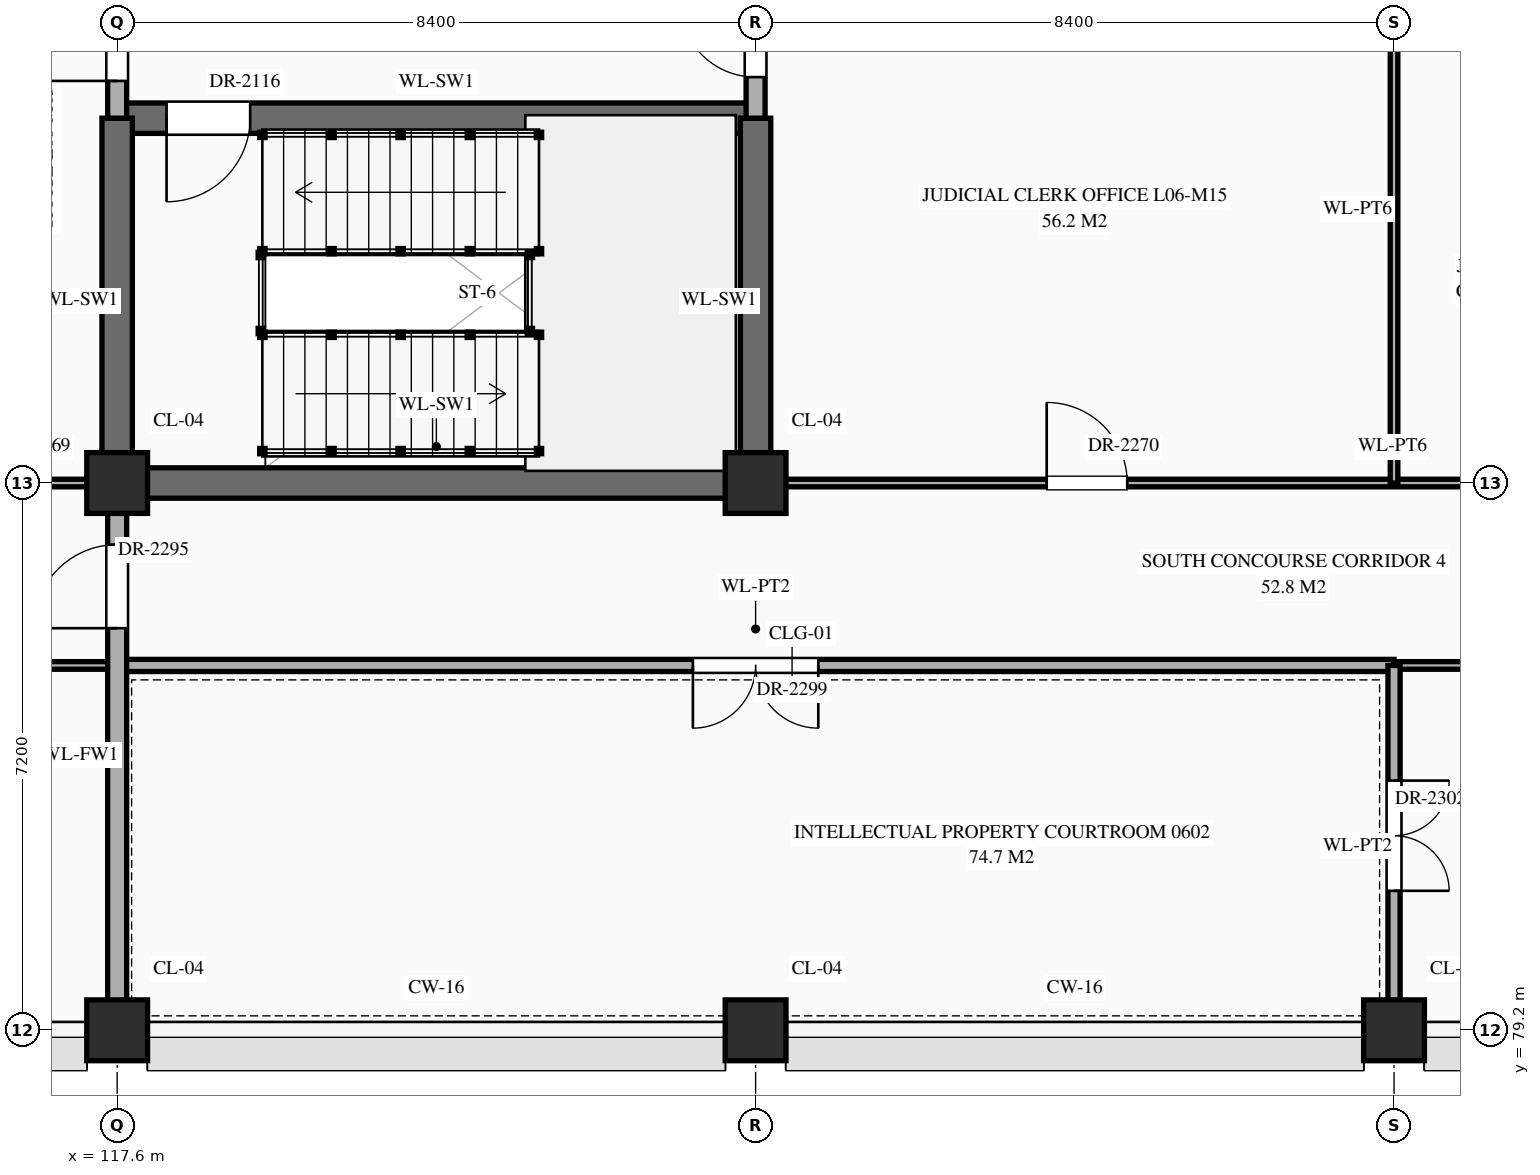
"""IFC4 building model, lengths in metres.
Left out: names, types, materials, properties, quantities, classifications, styles, units other than length and angle.
Written with IfcOpenShell. Run it as: python <this file> out.ifc"""

import sys

from ifc_helpers import new_model, si_unit, direction, frame, frame_2d, origin, origin_2d, place, context, subcontext, project, spatial, rectangle, extrude, element, fill, save


model = new_model("IFC4")
c1 = context("Model", 3, precision=1e-05, world=origin(), true_north=direction((0.0, 1.0)))
c2 = subcontext(c1, "Body", "Model", "MODEL_VIEW")
j1 = project(units=[si_unit("LENGTHUNIT", "METRE"), si_unit("PLANEANGLEUNIT", "RADIAN")], contexts=[c1])
p1 = place(None, origin())
s1 = spatial("IfcSite", under=j1, at=p1, CompositionType="ELEMENT")
p2 = place(p1, origin())
s2 = spatial("IfcBuilding", under=s1, at=p2, CompositionType="ELEMENT")
p3 = place(p2, frame((0.0, 0.0, 26.1)))
s3 = spatial("IfcBuildingStorey", under=s2, at=p3, CompositionType="ELEMENT", Elevation=26.1)
for number, where, z_axis, x_axis in (
    (1, (117.6, 79.2, 0.0), (0.0, 0.0, 1.0), (1.0, 0.0, 0.0)),
    (2, (117.6, 86.4, 0.0), (0.0, 0.0, 1.0), (1.0, 0.0, 0.0)),
    (3, (126.0, 79.2, 0.0), (0.0, 0.0, 1.0), (1.0, 0.0, 0.0)),
    (4, (126.0, 86.4, 0.0), (0.0, 0.0, 1.0), (1.0, 0.0, 0.0)),
    (5, (134.4, 79.2, 0.0), (0.0, 0.0, 1.0), (1.0, 0.0, 0.0)),
):
    element("IfcColumn", number, at=place(p3, frame(where, z_axis=z_axis, x_axis=x_axis)), inside=s3, PredefinedType="COLUMN", context=c2, shape_type="SweptSolid", body=[
        extrude(rectangle(XDim=0.8, YDim=0.8, at=origin_2d()), origin(), (0.0, 0.0, 1.0), 4.5),
    ])
p4 = place(p3, frame((100.8, 84.0, 0.0), z_axis=(0.0, 0.0, 1.0), x_axis=(1.0, 0.0, 0.0)))
e6 = element("IfcWall", 6, at=p4, inside=s3, PredefinedType="STANDARD", context=c2, shape_type="SweptSolid", body=[
    extrude(rectangle(XDim=16.8, YDim=0.1, at=frame_2d((8.4, 0.0))), origin(), (0.0, 0.0, 1.0), 4.24),
])
p5 = place(p4, frame((3.62, 0.0, 0.0)))
e7 = element("IfcOpeningElement", 7, at=p5, cuts=e6, PredefinedType="OPENING", context=c2, shape_type="SweptSolid", body=[
    extrude(rectangle(XDim=1.16, YDim=2.3, at=frame_2d((0.58, 1.15))), frame((0.0, 0.062, 0.0), z_axis=(0.0, -1.0, 0.0), x_axis=(1.0, 0.0, 0.0)), (0.0, 0.0, 1.0), 0.124),
])
p6 = place(p4, frame((12.0, 0.0, 0.0)))
e8 = element("IfcOpeningElement", 8, at=p6, cuts=e6, PredefinedType="OPENING", context=c2, shape_type="SweptSolid", body=[
    extrude(rectangle(XDim=1.2, YDim=2.35, at=frame_2d((0.6, 1.175))), frame((0.0, 0.062, 0.0), z_axis=(0.0, -1.0, 0.0), x_axis=(1.0, 0.0, 0.0)), (0.0, 0.0, 1.0), 0.124),
])
p7 = place(p3, frame((117.6, 84.0, 0.0), z_axis=(0.0, 0.0, 1.0), x_axis=(1.0, 0.0, 0.0)))
e9 = element("IfcWall", 9, at=p7, inside=s3, PredefinedType="STANDARD", context=c2, shape_type="SweptSolid", body=[
    extrude(rectangle(XDim=16.8, YDim=0.16, at=frame_2d((8.4, 0.0))), origin(), (0.0, 0.0, 1.0), 4.24),
])
p8 = place(p7, frame((7.575, 0.0, 0.0)))
e10 = element("IfcOpeningElement", 10, at=p8, cuts=e9, PredefinedType="OPENING", context=c2, shape_type="SweptSolid", body=[
    extrude(rectangle(XDim=1.65, YDim=2.4, at=frame_2d((0.825, 1.2))), frame((0.0, 0.092, 0.0), z_axis=(0.0, -1.0, 0.0), x_axis=(1.0, 0.0, 0.0)), (0.0, 0.0, 1.0), 0.184),
])
p9 = place(p3, frame((134.4, 84.0, 0.0), z_axis=(0.0, 0.0, 1.0), x_axis=(1.0, 0.0, 0.0)))
e11 = element("IfcWall", 11, at=p9, inside=s3, PredefinedType="STANDARD", context=c2, shape_type="SweptSolid", body=[
    extrude(rectangle(XDim=8.36, YDim=0.1, at=frame_2d((4.18, 0.0))), origin(), (0.0, 0.0, 1.0), 4.24),
])
p10 = place(p9, frame((3.405, 0.0, 0.0)))
e12 = element("IfcOpeningElement", 12, at=p10, cuts=e11, PredefinedType="OPENING", context=c2, shape_type="SweptSolid", body=[
    extrude(rectangle(XDim=1.55, YDim=2.35, at=frame_2d((0.775, 1.175))), frame((0.0, 0.062, 0.0), z_axis=(0.0, -1.0, 0.0), x_axis=(1.0, 0.0, 0.0)), (0.0, 0.0, 1.0), 0.124),
])
p11 = place(p3, frame((109.2, 86.4, 0.0), z_axis=(0.0, 0.0, 1.0), x_axis=(1.0, 0.0, 0.0)))
e13 = element("IfcWall", 13, at=p11, inside=s3, PredefinedType="STANDARD", context=c2, shape_type="SweptSolid", body=[
    extrude(rectangle(XDim=8.4, YDim=0.1, at=frame_2d((4.2, 0.0))), origin(), (0.0, 0.0, 1.0), 3.39),
])
p12 = place(p11, frame((0.92, 0.0, 0.0)))
e14 = element("IfcOpeningElement", 14, at=p12, cuts=e13, PredefinedType="OPENING", context=c2, shape_type="SweptSolid", body=[
    extrude(rectangle(XDim=1.28, YDim=2.35, at=frame_2d((0.64, 1.175))), frame((0.0, 0.062, 0.0), z_axis=(0.0, -1.0, 0.0), x_axis=(1.0, 0.0, 0.0)), (0.0, 0.0, 1.0), 0.124),
])
p13 = place(p11, frame((3.71, 0.0, 0.0)))
e15 = element("IfcOpeningElement", 15, at=p13, cuts=e13, PredefinedType="OPENING", context=c2, shape_type="SweptSolid", body=[
    extrude(rectangle(XDim=0.98, YDim=2.35, at=frame_2d((0.49, 1.175))), frame((0.0, 0.062, 0.0), z_axis=(0.0, -1.0, 0.0), x_axis=(1.0, 0.0, 0.0)), (0.0, 0.0, 1.0), 0.124),
])
p14 = place(p11, frame((6.33, 0.0, 0.0)))
e16 = element("IfcOpeningElement", 16, at=p14, cuts=e13, PredefinedType="OPENING", context=c2, shape_type="SweptSolid", body=[
    extrude(rectangle(XDim=1.02, YDim=2.4, at=frame_2d((0.51, 1.2))), frame((0.0, 0.062, 0.0), z_axis=(0.0, -1.0, 0.0), x_axis=(1.0, 0.0, 0.0)), (0.0, 0.0, 1.0), 0.124),
])
p15 = place(p3, frame((117.6, 86.4, 0.0), z_axis=(0.0, 0.0, 1.0), x_axis=(1.0, 0.0, 0.0)))
e17 = element("IfcWall", 17, at=p15, inside=s3, PredefinedType="SHEAR", context=c2, shape_type="SweptSolid", body=[
    extrude(rectangle(XDim=8.4, YDim=0.4, at=frame_2d((4.2, 0.0))), origin(), (0.0, 0.0, 1.0), 4.24),
])
p16 = place(p3, frame((126.0, 86.4, 0.0), z_axis=(0.0, 0.0, 1.0), x_axis=(1.0, 0.0, 0.0)))
e18 = element("IfcWall", 18, at=p16, inside=s3, PredefinedType="STANDARD", context=c2, shape_type="SweptSolid", body=[
    extrude(rectangle(XDim=16.76, YDim=0.1, at=frame_2d((8.38, 0.0))), origin(), (0.0, 0.0, 1.0), 3.19),
])
p17 = place(p16, frame((3.83, 0.0, 0.0)))
e19 = element("IfcOpeningElement", 19, at=p17, cuts=e18, PredefinedType="OPENING", context=c2, shape_type="SweptSolid", body=[
    extrude(rectangle(XDim=1.06, YDim=2.4, at=frame_2d((0.53, 1.2))), frame((0.0, 0.062, 0.0), z_axis=(0.0, -1.0, 0.0), x_axis=(1.0, 0.0, 0.0)), (0.0, 0.0, 1.0), 0.124),
])
p18 = place(p16, frame((9.35, 0.0, 0.0)))
e20 = element("IfcOpeningElement", 20, at=p18, cuts=e18, PredefinedType="OPENING", context=c2, shape_type="SweptSolid", body=[
    extrude(rectangle(XDim=0.9, YDim=2.15, at=frame_2d((0.45, 1.075))), frame((0.0, 0.062, 0.0), z_axis=(0.0, -1.0, 0.0), x_axis=(1.0, 0.0, 0.0)), (0.0, 0.0, 1.0), 0.124),
])
p19 = place(p16, frame((11.7, 0.0, 0.0)))
e21 = element("IfcOpeningElement", 21, at=p19, cuts=e18, PredefinedType="OPENING", context=c2, shape_type="SweptSolid", body=[
    extrude(rectangle(XDim=1.8, YDim=2.5, at=frame_2d((0.9, 1.25))), frame((0.0, 0.062, 0.0), z_axis=(0.0, -1.0, 0.0), x_axis=(1.0, 0.0, 0.0)), (0.0, 0.0, 1.0), 0.124),
])
p20 = place(p16, frame((14.76, 0.0, 0.0)))
e22 = element("IfcOpeningElement", 22, at=p20, cuts=e18, PredefinedType="OPENING", context=c2, shape_type="SweptSolid", body=[
    extrude(rectangle(XDim=0.96, YDim=2.2, at=frame_2d((0.48, 1.1))), frame((0.0, 0.062, 0.0), z_axis=(0.0, -1.0, 0.0), x_axis=(1.0, 0.0, 0.0)), (0.0, 0.0, 1.0), 0.124),
])
p21 = place(p3, frame((117.6, 91.2, 0.0), z_axis=(0.0, 0.0, 1.0), x_axis=(1.0, 0.0, 0.0)))
e23 = element("IfcWall", 23, at=p21, inside=s3, PredefinedType="SHEAR", context=c2, shape_type="SweptSolid", body=[
    extrude(rectangle(XDim=8.4, YDim=0.4, at=frame_2d((4.2, 0.0))), origin(), (0.0, 0.0, 1.0), 4.24),
])
p22 = place(p21, frame((0.65, 0.0, 0.0)))
e24 = element("IfcOpeningElement", 24, at=p22, cuts=e23, PredefinedType="OPENING", context=c2, shape_type="SweptSolid", body=[
    extrude(rectangle(XDim=1.1, YDim=2.2, at=frame_2d((0.55, 1.1))), frame((0.0, 0.212, 0.0), z_axis=(0.0, -1.0, 0.0), x_axis=(1.0, 0.0, 0.0)), (0.0, 0.0, 1.0), 0.424),
])
p23 = place(p3, frame((117.6, 79.24, 0.0), z_axis=(0.0, 0.0, 1.0), x_axis=(0.0, 1.0, 0.0)))
e25 = element("IfcWall", 25, at=p23, inside=s3, PredefinedType="STANDARD", context=c2, shape_type="SweptSolid", body=[
    extrude(rectangle(XDim=7.16, YDim=0.25, at=frame_2d((3.58, 0.0))), origin(), (0.0, 0.0, 1.0), 3.49),
])
p24 = place(p23, frame((5.25, 0.0, 0.0)))
e26 = element("IfcOpeningElement", 26, at=p24, cuts=e25, PredefinedType="OPENING", context=c2, shape_type="SweptSolid", body=[
    extrude(rectangle(XDim=1.1, YDim=2.2, at=frame_2d((0.55, 1.1))), frame((0.0, 0.137, 0.0), z_axis=(0.0, -1.0, 0.0), x_axis=(1.0, 0.0, 0.0)), (0.0, 0.0, 1.0), 0.274),
])
p25 = place(p3, frame((117.6, 86.4, 0.0), z_axis=(0.0, 0.0, 1.0), x_axis=(0.0, 1.0, 0.0)))
e27 = element("IfcWall", 27, at=p25, inside=s3, PredefinedType="SHEAR", context=c2, shape_type="SweptSolid", body=[
    extrude(rectangle(XDim=4.8, YDim=0.4, at=frame_2d((2.4, 0.0))), origin(), (0.0, 0.0, 1.0), 4.24),
])
p26 = place(p3, frame((117.6, 91.2, 0.0), z_axis=(0.0, 0.0, 1.0), x_axis=(0.0, 1.0, 0.0)))
e28 = element("IfcWall", 28, at=p26, inside=s3, PredefinedType="STANDARD", context=c2, shape_type="SweptSolid", body=[
    extrude(rectangle(XDim=13.2, YDim=0.25, at=frame_2d((6.6, 0.0))), origin(), (0.0, 0.0, 1.0), 3.49),
])
p27 = place(p26, frame((0.49, 0.0, 0.0)))
e29 = element("IfcOpeningElement", 29, at=p27, cuts=e28, PredefinedType="OPENING", context=c2, shape_type="SweptSolid", body=[
    extrude(rectangle(XDim=1.1, YDim=2.2, at=frame_2d((0.55, 1.1))), frame((0.0, 0.137, 0.0), z_axis=(0.0, -1.0, 0.0), x_axis=(1.0, 0.0, 0.0)), (0.0, 0.0, 1.0), 0.274),
])
p28 = place(p26, frame((10.46, 0.0, 0.0)))
e30 = element("IfcOpeningElement", 30, at=p28, cuts=e28, PredefinedType="OPENING", context=c2, shape_type="SweptSolid", body=[
    extrude(rectangle(XDim=1.0, YDim=2.2, at=frame_2d((0.5, 1.1))), frame((0.0, 0.137, 0.0), z_axis=(0.0, -1.0, 0.0), x_axis=(1.0, 0.0, 0.0)), (0.0, 0.0, 1.0), 0.274),
])
p29 = place(p26, frame((3.26, 0.0, 0.0)))
e31 = element("IfcOpeningElement", 31, at=p29, cuts=e28, PredefinedType="OPENING", context=c2, shape_type="SweptSolid", body=[
    extrude(rectangle(XDim=1.0, YDim=2.2, at=frame_2d((0.5, 1.1))), frame((0.0, 0.137, 0.0), z_axis=(0.0, -1.0, 0.0), x_axis=(1.0, 0.0, 0.0)), (0.0, 0.0, 1.0), 0.274),
])
p30 = place(p3, frame((126.0, 86.4, 0.0), z_axis=(0.0, 0.0, 1.0), x_axis=(0.0, 1.0, 0.0)))
e32 = element("IfcWall", 32, at=p30, inside=s3, PredefinedType="SHEAR", context=c2, shape_type="SweptSolid", body=[
    extrude(rectangle(XDim=4.8, YDim=0.4, at=frame_2d((2.4, 0.0))), origin(), (0.0, 0.0, 1.0), 4.24),
])
p31 = place(p3, frame((126.0, 91.2, 0.0), z_axis=(0.0, 0.0, 1.0), x_axis=(0.0, 1.0, 0.0)))
e33 = element("IfcWall", 33, at=p31, inside=s3, PredefinedType="STANDARD", context=c2, shape_type="SweptSolid", body=[
    extrude(rectangle(XDim=2.4, YDim=0.25, at=frame_2d((1.2, 0.0))), origin(), (0.0, 0.0, 1.0), 3.49),
])
p32 = place(p31, frame((0.54, 0.0, 0.0)))
e34 = element("IfcOpeningElement", 34, at=p32, cuts=e33, PredefinedType="OPENING", context=c2, shape_type="SweptSolid", body=[
    extrude(rectangle(XDim=1.0, YDim=2.2, at=frame_2d((0.5, 1.1))), frame((0.0, 0.137, 0.0), z_axis=(0.0, -1.0, 0.0), x_axis=(1.0, 0.0, 0.0)), (0.0, 0.0, 1.0), 0.274),
])
p33 = place(p3, frame((134.4, 79.24, 0.0), z_axis=(0.0, 0.0, 1.0), x_axis=(0.0, 1.0, 0.0)))
e35 = element("IfcWall", 35, at=p33, inside=s3, PredefinedType="STANDARD", context=c2, shape_type="SweptSolid", body=[
    extrude(rectangle(XDim=4.76, YDim=0.16, at=frame_2d((2.38, 0.0))), origin(), (0.0, 0.0, 1.0), 4.24),
])
p34 = place(p33, frame((1.795, 0.0, 0.0)))
e36 = element("IfcOpeningElement", 36, at=p34, cuts=e35, PredefinedType="OPENING", context=c2, shape_type="SweptSolid", body=[
    extrude(rectangle(XDim=1.45, YDim=2.3, at=frame_2d((0.725, 1.15))), frame((0.0, 0.092, 0.0), z_axis=(0.0, -1.0, 0.0), x_axis=(1.0, 0.0, 0.0)), (0.0, 0.0, 1.0), 0.184),
])
p35 = place(p3, frame((134.4, 86.4, 0.0), z_axis=(0.0, 0.0, 1.0), x_axis=(0.0, 1.0, 0.0)))
e37 = element("IfcWall", 37, at=p35, inside=s3, PredefinedType="STANDARD", context=c2, shape_type="SweptSolid", body=[
    extrude(rectangle(XDim=7.2, YDim=0.1, at=frame_2d((3.6, 0.0))), origin(), (0.0, 0.0, 1.0), 4.24),
])
p36 = place(p22, frame((1.1, 0.0, 0.0), z_axis=(0.0, 0.0, 1.0), x_axis=(-1.0, 0.0, 0.0)))
e38 = element("IfcDoor", 38, at=p36, inside=s3, OperationType="SINGLE_SWING_RIGHT", PredefinedType="DOOR", context=c2, shape_type="SweptSolid", body=[
    extrude(rectangle(XDim=1.1, YDim=2.2, at=frame_2d((0.55, 1.1))), frame((0.0, 0.025, 0.0), z_axis=(0.0, -1.0, 0.0), x_axis=(1.0, 0.0, 0.0)), (0.0, 0.0, 1.0), 0.05),
])
fill(e24, e38)
p37 = place(p27, origin())
e39 = element("IfcDoor", 39, at=p37, inside=s3, OperationType="SINGLE_SWING_LEFT", PredefinedType="DOOR", context=c2, shape_type="SweptSolid", body=[
    extrude(rectangle(XDim=1.1, YDim=2.2, at=frame_2d((0.55, 1.1))), frame((0.0, 0.025, 0.0), z_axis=(0.0, -1.0, 0.0), x_axis=(1.0, 0.0, 0.0)), (0.0, 0.0, 1.0), 0.05),
])
fill(e29, e39)
p38 = place(p32, origin())
e40 = element("IfcDoor", 40, at=p38, inside=s3, OperationType="SINGLE_SWING_RIGHT", PredefinedType="DOOR", context=c2, shape_type="SweptSolid", body=[
    extrude(rectangle(XDim=1.0, YDim=2.2, at=frame_2d((0.5, 1.1))), frame((0.0, 0.025, 0.0), z_axis=(0.0, -1.0, 0.0), x_axis=(1.0, 0.0, 0.0)), (0.0, 0.0, 1.0), 0.05),
])
fill(e34, e40)
p39 = place(p17, origin())
e41 = element("IfcDoor", 41, at=p39, inside=s3, OperationType="SINGLE_SWING_LEFT", PredefinedType="DOOR", context=c2, shape_type="SweptSolid", body=[
    extrude(rectangle(XDim=1.06, YDim=2.4, at=frame_2d((0.53, 1.2))), frame((0.0, 0.025, 0.0), z_axis=(0.0, -1.0, 0.0), x_axis=(1.0, 0.0, 0.0)), (0.0, 0.0, 1.0), 0.05),
])
fill(e19, e41)
p40 = place(p24, origin())
e42 = element("IfcDoor", 42, at=p40, inside=s3, OperationType="SINGLE_SWING_LEFT", PredefinedType="DOOR", context=c2, shape_type="SweptSolid", body=[
    extrude(rectangle(XDim=1.1, YDim=2.2, at=frame_2d((0.55, 1.1))), frame((0.0, 0.025, 0.0), z_axis=(0.0, -1.0, 0.0), x_axis=(1.0, 0.0, 0.0)), (0.0, 0.0, 1.0), 0.05),
])
fill(e26, e42)
p41 = place(p8, frame((1.65, 0.0, 0.0), z_axis=(0.0, 0.0, 1.0), x_axis=(-1.0, 0.0, 0.0)))
e43 = element("IfcDoor", 43, at=p41, inside=s3, OperationType="DOUBLE_DOOR_SINGLE_SWING", PredefinedType="DOOR", context=c2, shape_type="SweptSolid", body=[
    extrude(rectangle(XDim=1.65, YDim=2.4, at=frame_2d((0.825, 1.2))), frame((0.0, 0.025, 0.0), z_axis=(0.0, -1.0, 0.0), x_axis=(1.0, 0.0, 0.0)), (0.0, 0.0, 1.0), 0.05),
])
fill(e10, e43)
p42 = place(p34, frame((1.45, 0.0, 0.0), z_axis=(0.0, 0.0, 1.0), x_axis=(-1.0, 0.0, 0.0)))
e44 = element("IfcDoor", 44, at=p42, inside=s3, OperationType="DOUBLE_DOOR_SINGLE_SWING", PredefinedType="DOOR", context=c2, shape_type="SweptSolid", body=[
    extrude(rectangle(XDim=1.45, YDim=2.3, at=frame_2d((0.725, 1.15))), frame((0.0, 0.025, 0.0), z_axis=(0.0, -1.0, 0.0), x_axis=(1.0, 0.0, 0.0)), (0.0, 0.0, 1.0), 0.05),
])
fill(e36, e44)
save(model, sys.argv[1])
